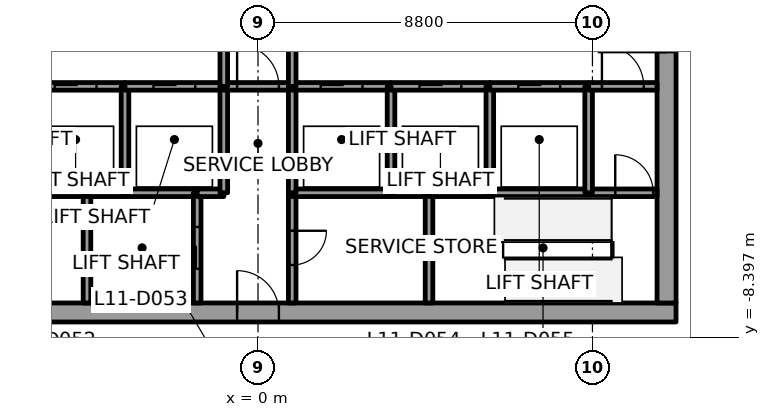
"""IFC4 building model, lengths in metres.
Left out: names, types, materials, properties, quantities, classifications, styles, units other than length and angle.
Written with IfcOpenShell. Run it as: python <this file> out.ifc"""

import sys

from ifc_helpers import new_model, si_unit, direction, frame, frame_2d, origin, place, context, subcontext, project, spatial, rectangle, extrude, element, fill, save


model = new_model("IFC4")
c1 = context("Model", 3, precision=1e-05, world=origin(), true_north=direction((0.0, 1.0)))
c2 = subcontext(c1, "Body", "Model", "MODEL_VIEW")
j1 = project(units=[si_unit("LENGTHUNIT", "METRE"), si_unit("PLANEANGLEUNIT", "RADIAN")], contexts=[c1])
p1 = place(None, origin())
s1 = spatial("IfcSite", under=j1, at=p1, CompositionType="ELEMENT")
p2 = place(p1, origin())
s2 = spatial("IfcBuilding", under=s1, at=p2, CompositionType="ELEMENT")
p3 = place(p2, frame((0.0, 0.0, 62.8)))
s3 = spatial("IfcBuildingStorey", under=s2, at=p3, CompositionType="ELEMENT", Elevation=62.8)
p4 = place(p3, frame((-11.0, -7.75, 0.0), z_axis=(0.0, 0.0, 1.0), x_axis=(1.0, 0.0, 0.0)))
e1 = element("IfcWall", 1, at=p4, inside=s3, PredefinedType="SHEAR", context=c2, shape_type="SweptSolid", body=[
    extrude(rectangle(XDim=22.0, YDim=0.5, at=frame_2d((11.0, 0.0))), origin(), (0.0, 0.0, 1.0), 3.7),
])
p5 = place(p4, frame((10.45, 0.0, 0.0)))
e2 = element("IfcOpeningElement", 2, at=p5, cuts=e1, PredefinedType="OPENING", context=c2, shape_type="SweptSolid", body=[
    extrude(rectangle(XDim=1.1, YDim=2.1, at=frame_2d((0.55, 1.05))), frame((0.0, 0.25, 0.0), z_axis=(0.0, -1.0, 0.0), x_axis=(1.0, 0.0, 0.0)), (0.0, 0.0, 1.0), 0.5),
])
p6 = place(p3, frame((10.75, -7.5, 0.0), z_axis=(0.0, 0.0, 1.0), x_axis=(0.0, 1.0, 0.0)))
e3 = element("IfcWall", 3, at=p6, inside=s3, PredefinedType="SHEAR", context=c2, shape_type="SweptSolid", body=[
    extrude(rectangle(XDim=15.0, YDim=0.5, at=frame_2d((7.5, 0.0))), origin(), (0.0, 0.0, 1.0), 3.7),
])
p7 = place(p6, frame((6.6, 0.0, 0.0)))
e4 = element("IfcOpeningElement", 4, at=p7, cuts=e3, PredefinedType="OPENING", context=c2, shape_type="SweptSolid", body=[
    extrude(rectangle(XDim=1.8, YDim=2.1, at=frame_2d((0.9, 1.05))), frame((0.0, 0.25, 0.0), z_axis=(0.0, -1.0, 0.0), x_axis=(1.0, 0.0, 0.0)), (0.0, 0.0, 1.0), 0.5),
])
p8 = place(p3, frame((-6.1, -4.6, 0.0), z_axis=(0.0, 0.0, 1.0), x_axis=(1.0, 0.0, 0.0)))
e5 = element("IfcWall", 5, at=p8, inside=s3, PredefinedType="SOLIDWALL", context=c2, shape_type="SweptSolid", body=[
    extrude(rectangle(XDim=1.6, YDim=0.2, at=frame_2d((0.8, 0.0))), origin(), (0.0, 0.0, 1.0), 3.55),
])
p9 = place(p3, frame((-6.1, -1.8, 0.0), z_axis=(0.0, 0.0, 1.0), x_axis=(1.0, 0.0, 0.0)))
e6 = element("IfcWall", 6, at=p9, inside=s3, PredefinedType="SOLIDWALL", context=c2, shape_type="SweptSolid", body=[
    extrude(rectangle(XDim=2.6, YDim=0.2, at=frame_2d((1.3, 0.0))), origin(), (0.0, 0.0, 1.0), 3.55),
])
p10 = place(p9, frame((0.75, 0.0, 0.0)))
e7 = element("IfcOpeningElement", 7, at=p10, cuts=e6, PredefinedType="OPENING", context=c2, shape_type="SweptSolid", body=[
    extrude(rectangle(XDim=1.1, YDim=2.1, at=frame_2d((0.55, 1.05))), frame((0.0, 0.1, 0.0), z_axis=(0.0, -1.0, 0.0), x_axis=(1.0, 0.0, 0.0)), (0.0, 0.0, 1.0), 0.2),
])
p11 = place(p3, frame((-4.5, -4.6, 0.0), z_axis=(0.0, 0.0, 1.0), x_axis=(0.0, -1.0, 0.0)))
e8 = element("IfcWall", 8, at=p11, inside=s3, PredefinedType="SOLIDWALL", context=c2, shape_type="SweptSolid", body=[
    extrude(rectangle(XDim=2.9, YDim=0.2, at=frame_2d((1.45, 0.0))), origin(), (0.0, 0.0, 1.0), 3.55),
])
p12 = place(p3, frame((-4.5, -4.6, 0.0), z_axis=(0.0, 0.0, 1.0), x_axis=(1.0, 0.0, 0.0)))
e9 = element("IfcWall", 9, at=p12, inside=s3, PredefinedType="SOLIDWALL", context=c2, shape_type="SweptSolid", body=[
    extrude(rectangle(XDim=1.0, YDim=0.2, at=frame_2d((0.5, 0.0))), origin(), (0.0, 0.0, 1.0), 3.55),
])
p13 = place(p3, frame((-3.5, -4.6, 0.0), z_axis=(0.0, 0.0, 1.0), x_axis=(1.0, 0.0, 0.0)))
e10 = element("IfcWall", 10, at=p13, inside=s3, PredefinedType="SOLIDWALL", context=c2, shape_type="SweptSolid", body=[
    extrude(rectangle(XDim=1.9, YDim=0.2, at=frame_2d((0.95, 0.0))), origin(), (0.0, 0.0, 1.0), 3.55),
])
p14 = place(p3, frame((-3.5, -4.6, 0.0), z_axis=(0.0, 0.0, 1.0), x_axis=(0.0, 1.0, 0.0)))
e11 = element("IfcWall", 11, at=p14, inside=s3, PredefinedType="SOLIDWALL", context=c2, shape_type="SweptSolid", body=[
    extrude(rectangle(XDim=2.8, YDim=0.2, at=frame_2d((1.4, 0.0))), origin(), (0.0, 0.0, 1.0), 3.55),
])
p15 = place(p3, frame((-3.5, -1.8, 0.0), z_axis=(0.0, 0.0, 1.0), x_axis=(1.0, 0.0, 0.0)))
e12 = element("IfcWall", 12, at=p15, inside=s3, PredefinedType="SOLIDWALL", context=c2, shape_type="SweptSolid", body=[
    extrude(rectangle(XDim=2.6, YDim=0.2, at=frame_2d((1.3, 0.0))), origin(), (0.0, 0.0, 1.0), 3.55),
])
p16 = place(p15, frame((0.75, 0.0, 0.0)))
e13 = element("IfcOpeningElement", 13, at=p16, cuts=e12, PredefinedType="OPENING", context=c2, shape_type="SweptSolid", body=[
    extrude(rectangle(XDim=1.1, YDim=2.1, at=frame_2d((0.55, 1.05))), frame((0.0, 0.1, 0.0), z_axis=(0.0, -1.0, 0.0), x_axis=(1.0, 0.0, 0.0)), (0.0, 0.0, 1.0), 0.2),
])
p17 = place(p3, frame((-1.6, -7.5, 0.0), z_axis=(0.0, 0.0, 1.0), x_axis=(0.0, 1.0, 0.0)))
e14 = element("IfcWall", 14, at=p17, inside=s3, PredefinedType="SOLIDWALL", context=c2, shape_type="SweptSolid", body=[
    extrude(rectangle(XDim=2.9, YDim=0.2, at=frame_2d((1.45, 0.0))), origin(), (0.0, 0.0, 1.0), 3.55),
])
p18 = place(p17, frame((0.9, 0.0, 0.0)))
e15 = element("IfcOpeningElement", 15, at=p18, cuts=e14, PredefinedType="OPENING", context=c2, shape_type="SweptSolid", body=[
    extrude(rectangle(XDim=1.1, YDim=2.1, at=frame_2d((0.55, 1.05))), frame((0.0, 0.1, 0.0), z_axis=(0.0, -1.0, 0.0), x_axis=(1.0, 0.0, 0.0)), (0.0, 0.0, 1.0), 0.2),
])
p19 = place(p3, frame((-1.6, -4.6, 0.0), z_axis=(0.0, 0.0, 1.0), x_axis=(1.0, 0.0, 0.0)))
e16 = element("IfcWall", 16, at=p19, inside=s3, PredefinedType="SOLIDWALL", context=c2, shape_type="SweptSolid", body=[
    extrude(rectangle(XDim=0.7, YDim=0.2, at=frame_2d((0.35, 0.0))), origin(), (0.0, 0.0, 1.0), 3.55),
])
p20 = place(p3, frame((-0.9, -4.6, 0.0), z_axis=(0.0, 0.0, 1.0), x_axis=(0.0, 1.0, 0.0)))
e17 = element("IfcWall", 17, at=p20, inside=s3, PredefinedType="SOLIDWALL", context=c2, shape_type="SweptSolid", body=[
    extrude(rectangle(XDim=2.8, YDim=0.2, at=frame_2d((1.4, 0.0))), origin(), (0.0, 0.0, 1.0), 3.55),
])
p21 = place(p3, frame((-0.9, -1.8, 0.0), z_axis=(0.0, 0.0, 1.0), x_axis=(1.0, 0.0, 0.0)))
e18 = element("IfcWall", 18, at=p21, inside=s3, PredefinedType="SOLIDWALL", context=c2, shape_type="SweptSolid", body=[
    extrude(rectangle(XDim=1.8, YDim=0.2, at=frame_2d((0.9, 0.0))), origin(), (0.0, 0.0, 1.0), 3.55),
])
p22 = place(p21, frame((0.35, 0.0, 0.0)))
e19 = element("IfcOpeningElement", 19, at=p22, cuts=e18, PredefinedType="OPENING", context=c2, shape_type="SweptSolid", body=[
    extrude(rectangle(XDim=1.1, YDim=2.1, at=frame_2d((0.55, 1.05))), frame((0.0, 0.1, 0.0), z_axis=(0.0, -1.0, 0.0), x_axis=(1.0, 0.0, 0.0)), (0.0, 0.0, 1.0), 0.2),
])
p23 = place(p3, frame((-0.9, 1.8, 0.0), z_axis=(0.0, 0.0, 1.0), x_axis=(0.0, -1.0, 0.0)))
e20 = element("IfcWall", 20, at=p23, inside=s3, PredefinedType="SOLIDWALL", context=c2, shape_type="SweptSolid", body=[
    extrude(rectangle(XDim=3.6, YDim=0.2, at=frame_2d((1.8, 0.0))), origin(), (0.0, 0.0, 1.0), 3.55),
])
p24 = place(p23, frame((1.05, 0.0, 0.0)))
e21 = element("IfcOpeningElement", 21, at=p24, cuts=e20, PredefinedType="OPENING", context=c2, shape_type="SweptSolid", body=[
    extrude(rectangle(XDim=1.5, YDim=2.1, at=frame_2d((0.75, 1.05))), frame((0.0, 0.1, 0.0), z_axis=(0.0, -1.0, 0.0), x_axis=(1.0, 0.0, 0.0)), (0.0, 0.0, 1.0), 0.2),
])
p25 = place(p3, frame((0.9, -4.6, 0.0), z_axis=(0.0, 0.0, 1.0), x_axis=(0.0, -1.0, 0.0)))
e22 = element("IfcWall", 22, at=p25, inside=s3, PredefinedType="SOLIDWALL", context=c2, shape_type="SweptSolid", body=[
    extrude(rectangle(XDim=2.9, YDim=0.2, at=frame_2d((1.45, 0.0))), origin(), (0.0, 0.0, 1.0), 3.55),
])
p26 = place(p25, frame((1.0, 0.0, 0.0)))
e23 = element("IfcOpeningElement", 23, at=p26, cuts=e22, PredefinedType="OPENING", context=c2, shape_type="SweptSolid", body=[
    extrude(rectangle(XDim=0.9, YDim=2.1, at=frame_2d((0.45, 1.05))), frame((0.0, 0.1, 0.0), z_axis=(0.0, -1.0, 0.0), x_axis=(1.0, 0.0, 0.0)), (0.0, 0.0, 1.0), 0.2),
])
p27 = place(p3, frame((3.5, -4.6, 0.0), z_axis=(0.0, 0.0, 1.0), x_axis=(-1.0, 0.0, 0.0)))
e24 = element("IfcWall", 24, at=p27, inside=s3, PredefinedType="SOLIDWALL", context=c2, shape_type="SweptSolid", body=[
    extrude(rectangle(XDim=2.6, YDim=0.2, at=frame_2d((1.3, 0.0))), origin(), (0.0, 0.0, 1.0), 3.55),
])
p28 = place(p3, frame((0.9, -1.8, 0.0), z_axis=(0.0, 0.0, 1.0), x_axis=(0.0, -1.0, 0.0)))
e25 = element("IfcWall", 25, at=p28, inside=s3, PredefinedType="SOLIDWALL", context=c2, shape_type="SweptSolid", body=[
    extrude(rectangle(XDim=2.8, YDim=0.2, at=frame_2d((1.4, 0.0))), origin(), (0.0, 0.0, 1.0), 3.55),
])
p29 = place(p3, frame((0.9, -1.8, 0.0), z_axis=(0.0, 0.0, 1.0), x_axis=(1.0, 0.0, 0.0)))
e26 = element("IfcWall", 26, at=p29, inside=s3, PredefinedType="SOLIDWALL", context=c2, shape_type="SweptSolid", body=[
    extrude(rectangle(XDim=2.6, YDim=0.2, at=frame_2d((1.3, 0.0))), origin(), (0.0, 0.0, 1.0), 3.55),
])
p30 = place(p29, frame((0.75, 0.0, 0.0)))
e27 = element("IfcOpeningElement", 27, at=p30, cuts=e26, PredefinedType="OPENING", context=c2, shape_type="SweptSolid", body=[
    extrude(rectangle(XDim=1.1, YDim=2.1, at=frame_2d((0.55, 1.05))), frame((0.0, 0.1, 0.0), z_axis=(0.0, -1.0, 0.0), x_axis=(1.0, 0.0, 0.0)), (0.0, 0.0, 1.0), 0.2),
])
p31 = place(p3, frame((0.9, -1.8, 0.0), z_axis=(0.0, 0.0, 1.0), x_axis=(0.0, 1.0, 0.0)))
e28 = element("IfcWall", 28, at=p31, inside=s3, PredefinedType="SOLIDWALL", context=c2, shape_type="SweptSolid", body=[
    extrude(rectangle(XDim=3.6, YDim=0.2, at=frame_2d((1.8, 0.0))), origin(), (0.0, 0.0, 1.0), 3.55),
])
p32 = place(p31, frame((1.05, 0.0, 0.0)))
e29 = element("IfcOpeningElement", 29, at=p32, cuts=e28, PredefinedType="OPENING", context=c2, shape_type="SweptSolid", body=[
    extrude(rectangle(XDim=1.5, YDim=2.1, at=frame_2d((0.75, 1.05))), frame((0.0, 0.1, 0.0), z_axis=(0.0, -1.0, 0.0), x_axis=(1.0, 0.0, 0.0)), (0.0, 0.0, 1.0), 0.2),
])
p33 = place(p3, frame((4.5, -4.6, 0.0), z_axis=(0.0, 0.0, 1.0), x_axis=(-1.0, 0.0, 0.0)))
e30 = element("IfcWall", 30, at=p33, inside=s3, PredefinedType="SOLIDWALL", context=c2, shape_type="SweptSolid", body=[
    extrude(rectangle(XDim=1.0, YDim=0.2, at=frame_2d((0.5, 0.0))), origin(), (0.0, 0.0, 1.0), 3.55),
])
p34 = place(p3, frame((3.5, -4.6, 0.0), z_axis=(0.0, 0.0, 1.0), x_axis=(0.0, 1.0, 0.0)))
e31 = element("IfcWall", 31, at=p34, inside=s3, PredefinedType="SOLIDWALL", context=c2, shape_type="SweptSolid", body=[
    extrude(rectangle(XDim=2.8, YDim=0.2, at=frame_2d((1.4, 0.0))), origin(), (0.0, 0.0, 1.0), 3.55),
])
p35 = place(p3, frame((3.5, -1.8, 0.0), z_axis=(0.0, 0.0, 1.0), x_axis=(1.0, 0.0, 0.0)))
e32 = element("IfcWall", 32, at=p35, inside=s3, PredefinedType="SOLIDWALL", context=c2, shape_type="SweptSolid", body=[
    extrude(rectangle(XDim=2.6, YDim=0.2, at=frame_2d((1.3, 0.0))), origin(), (0.0, 0.0, 1.0), 3.55),
])
p36 = place(p35, frame((0.75, 0.0, 0.0)))
e33 = element("IfcOpeningElement", 33, at=p36, cuts=e32, PredefinedType="OPENING", context=c2, shape_type="SweptSolid", body=[
    extrude(rectangle(XDim=1.1, YDim=2.1, at=frame_2d((0.55, 1.05))), frame((0.0, 0.1, 0.0), z_axis=(0.0, -1.0, 0.0), x_axis=(1.0, 0.0, 0.0)), (0.0, 0.0, 1.0), 0.2),
])
p37 = place(p3, frame((4.5, -7.5, 0.0), z_axis=(0.0, 0.0, 1.0), x_axis=(0.0, 1.0, 0.0)))
e34 = element("IfcWall", 34, at=p37, inside=s3, PredefinedType="SOLIDWALL", context=c2, shape_type="SweptSolid", body=[
    extrude(rectangle(XDim=2.9, YDim=0.2, at=frame_2d((1.45, 0.0))), origin(), (0.0, 0.0, 1.0), 3.55),
])
p38 = place(p3, frame((4.5, -4.6, 0.0), z_axis=(0.0, 0.0, 1.0), x_axis=(1.0, 0.0, 0.0)))
e35 = element("IfcWall", 35, at=p38, inside=s3, PredefinedType="SOLIDWALL", context=c2, shape_type="SweptSolid", body=[
    extrude(rectangle(XDim=1.6, YDim=0.2, at=frame_2d((0.8, 0.0))), origin(), (0.0, 0.0, 1.0), 3.55),
])
p39 = place(p3, frame((6.1, -4.6, 0.0), z_axis=(0.0, 0.0, 1.0), x_axis=(1.0, 0.0, 0.0)))
e36 = element("IfcWall", 36, at=p39, inside=s3, PredefinedType="SOLIDWALL", context=c2, shape_type="SweptSolid", body=[
    extrude(rectangle(XDim=2.6, YDim=0.2, at=frame_2d((1.3, 0.0))), origin(), (0.0, 0.0, 1.0), 3.55),
])
p40 = place(p3, frame((6.1, -4.6, 0.0), z_axis=(0.0, 0.0, 1.0), x_axis=(0.0, 1.0, 0.0)))
e37 = element("IfcWall", 37, at=p40, inside=s3, PredefinedType="SOLIDWALL", context=c2, shape_type="SweptSolid", body=[
    extrude(rectangle(XDim=2.8, YDim=0.2, at=frame_2d((1.4, 0.0))), origin(), (0.0, 0.0, 1.0), 3.55),
])
p41 = place(p3, frame((6.1, -1.8, 0.0), z_axis=(0.0, 0.0, 1.0), x_axis=(1.0, 0.0, 0.0)))
e38 = element("IfcWall", 38, at=p41, inside=s3, PredefinedType="SOLIDWALL", context=c2, shape_type="SweptSolid", body=[
    extrude(rectangle(XDim=2.6, YDim=0.2, at=frame_2d((1.3, 0.0))), origin(), (0.0, 0.0, 1.0), 3.55),
])
p42 = place(p41, frame((0.75, 0.0, 0.0)))
e39 = element("IfcOpeningElement", 39, at=p42, cuts=e38, PredefinedType="OPENING", context=c2, shape_type="SweptSolid", body=[
    extrude(rectangle(XDim=1.1, YDim=2.1, at=frame_2d((0.55, 1.05))), frame((0.0, 0.1, 0.0), z_axis=(0.0, -1.0, 0.0), x_axis=(1.0, 0.0, 0.0)), (0.0, 0.0, 1.0), 0.2),
])
p43 = place(p3, frame((8.7, -4.6, 0.0), z_axis=(0.0, 0.0, 1.0), x_axis=(1.0, 0.0, 0.0)))
e40 = element("IfcWall", 40, at=p43, inside=s3, PredefinedType="SOLIDWALL", context=c2, shape_type="SweptSolid", body=[
    extrude(rectangle(XDim=1.8, YDim=0.2, at=frame_2d((0.9, 0.0))), origin(), (0.0, 0.0, 1.0), 3.55),
])
p44 = place(p43, frame((0.7, 0.0, 0.0)))
e41 = element("IfcOpeningElement", 41, at=p44, cuts=e40, PredefinedType="OPENING", context=c2, shape_type="SweptSolid", body=[
    extrude(rectangle(XDim=1.0, YDim=2.1, at=frame_2d((0.5, 1.05))), frame((0.0, 0.1, 0.0), z_axis=(0.0, -1.0, 0.0), x_axis=(1.0, 0.0, 0.0)), (0.0, 0.0, 1.0), 0.2),
])
p45 = place(p3, frame((8.7, -1.8, 0.0), z_axis=(0.0, 0.0, 1.0), x_axis=(0.0, -1.0, 0.0)))
e42 = element("IfcWall", 42, at=p45, inside=s3, PredefinedType="SOLIDWALL", context=c2, shape_type="SweptSolid", body=[
    extrude(rectangle(XDim=2.8, YDim=0.2, at=frame_2d((1.4, 0.0))), origin(), (0.0, 0.0, 1.0), 3.55),
])
p46 = place(p3, frame((8.7, -1.8, 0.0), z_axis=(0.0, 0.0, 1.0), x_axis=(1.0, 0.0, 0.0)))
e43 = element("IfcWall", 43, at=p46, inside=s3, PredefinedType="SOLIDWALL", context=c2, shape_type="SweptSolid", body=[
    extrude(rectangle(XDim=1.8, YDim=0.2, at=frame_2d((0.9, 0.0))), origin(), (0.0, 0.0, 1.0), 3.55),
])
p47 = place(p46, frame((0.35, 0.0, 0.0)))
e44 = element("IfcOpeningElement", 44, at=p47, cuts=e43, PredefinedType="OPENING", context=c2, shape_type="SweptSolid", body=[
    extrude(rectangle(XDim=1.1, YDim=2.1, at=frame_2d((0.55, 1.05))), frame((0.0, 0.1, 0.0), z_axis=(0.0, -1.0, 0.0), x_axis=(1.0, 0.0, 0.0)), (0.0, 0.0, 1.0), 0.2),
])
p48 = place(p10, origin())
e45 = element("IfcDoor", 45, at=p48, inside=s3, OperationType="SLIDING_TO_RIGHT", PredefinedType="DOOR", context=c2, shape_type="SweptSolid", body=[
    extrude(rectangle(XDim=1.1, YDim=2.1, at=frame_2d((0.55, 1.05))), frame((0.0, 0.025, 0.0), z_axis=(0.0, -1.0, 0.0), x_axis=(1.0, 0.0, 0.0)), (0.0, 0.0, 1.0), 0.05),
])
fill(e7, e45)
p49 = place(p16, origin())
e46 = element("IfcDoor", 46, at=p49, inside=s3, OperationType="SLIDING_TO_RIGHT", PredefinedType="DOOR", context=c2, shape_type="SweptSolid", body=[
    extrude(rectangle(XDim=1.1, YDim=2.1, at=frame_2d((0.55, 1.05))), frame((0.0, 0.025, 0.0), z_axis=(0.0, -1.0, 0.0), x_axis=(1.0, 0.0, 0.0)), (0.0, 0.0, 1.0), 0.05),
])
fill(e13, e46)
p50 = place(p30, origin())
e47 = element("IfcDoor", 47, at=p50, inside=s3, OperationType="SLIDING_TO_LEFT", PredefinedType="DOOR", context=c2, shape_type="SweptSolid", body=[
    extrude(rectangle(XDim=1.1, YDim=2.1, at=frame_2d((0.55, 1.05))), frame((0.0, 0.025, 0.0), z_axis=(0.0, -1.0, 0.0), x_axis=(1.0, 0.0, 0.0)), (0.0, 0.0, 1.0), 0.05),
])
fill(e27, e47)
p51 = place(p36, origin())
e48 = element("IfcDoor", 48, at=p51, inside=s3, OperationType="SLIDING_TO_LEFT", PredefinedType="DOOR", context=c2, shape_type="SweptSolid", body=[
    extrude(rectangle(XDim=1.1, YDim=2.1, at=frame_2d((0.55, 1.05))), frame((0.0, 0.025, 0.0), z_axis=(0.0, -1.0, 0.0), x_axis=(1.0, 0.0, 0.0)), (0.0, 0.0, 1.0), 0.05),
])
fill(e33, e48)
p52 = place(p42, origin())
e49 = element("IfcDoor", 49, at=p52, inside=s3, OperationType="SLIDING_TO_RIGHT", PredefinedType="DOOR", context=c2, shape_type="SweptSolid", body=[
    extrude(rectangle(XDim=1.1, YDim=2.1, at=frame_2d((0.55, 1.05))), frame((0.0, 0.025, 0.0), z_axis=(0.0, -1.0, 0.0), x_axis=(1.0, 0.0, 0.0)), (0.0, 0.0, 1.0), 0.05),
])
fill(e39, e49)
p53 = place(p18, origin())
e50 = element("IfcDoor", 50, at=p53, inside=s3, OperationType="SLIDING_TO_RIGHT", PredefinedType="DOOR", context=c2, shape_type="SweptSolid", body=[
    extrude(rectangle(XDim=1.1, YDim=2.1, at=frame_2d((0.55, 1.05))), frame((0.0, 0.025, 0.0), z_axis=(0.0, -1.0, 0.0), x_axis=(1.0, 0.0, 0.0)), (0.0, 0.0, 1.0), 0.05),
])
fill(e15, e50)
p54 = place(p47, origin())
e51 = element("IfcDoor", 51, at=p54, inside=s3, OperationType="SINGLE_SWING_LEFT", PredefinedType="DOOR", context=c2, shape_type="SweptSolid", body=[
    extrude(rectangle(XDim=1.1, YDim=2.1, at=frame_2d((0.55, 1.05))), frame((0.0, 0.025, 0.0), z_axis=(0.0, -1.0, 0.0), x_axis=(1.0, 0.0, 0.0)), (0.0, 0.0, 1.0), 0.05),
])
fill(e44, e51)
p55 = place(p22, origin())
e52 = element("IfcDoor", 52, at=p55, inside=s3, OperationType="SINGLE_SWING_LEFT", PredefinedType="DOOR", context=c2, shape_type="SweptSolid", body=[
    extrude(rectangle(XDim=1.1, YDim=2.1, at=frame_2d((0.55, 1.05))), frame((0.0, 0.025, 0.0), z_axis=(0.0, -1.0, 0.0), x_axis=(1.0, 0.0, 0.0)), (0.0, 0.0, 1.0), 0.05),
])
fill(e19, e52)
p56 = place(p44, origin())
e53 = element("IfcDoor", 53, at=p56, inside=s3, OperationType="SINGLE_SWING_RIGHT", PredefinedType="DOOR", context=c2, shape_type="SweptSolid", body=[
    extrude(rectangle(XDim=1.0, YDim=2.1, at=frame_2d((0.5, 1.05))), frame((0.0, 0.025, 0.0), z_axis=(0.0, -1.0, 0.0), x_axis=(1.0, 0.0, 0.0)), (0.0, 0.0, 1.0), 0.05),
])
fill(e41, e53)
p57 = place(p26, origin())
e54 = element("IfcDoor", 54, at=p57, inside=s3, OperationType="SINGLE_SWING_RIGHT", PredefinedType="DOOR", context=c2, shape_type="SweptSolid", body=[
    extrude(rectangle(XDim=0.9, YDim=2.1, at=frame_2d((0.45, 1.05))), frame((0.0, 0.025, 0.0), z_axis=(0.0, -1.0, 0.0), x_axis=(1.0, 0.0, 0.0)), (0.0, 0.0, 1.0), 0.05),
])
fill(e23, e54)
p58 = place(p7, origin())
e55 = element("IfcDoor", 55, at=p58, inside=s3, OperationType="DOUBLE_DOOR_SINGLE_SWING", PredefinedType="DOOR", context=c2, shape_type="SweptSolid", body=[
    extrude(rectangle(XDim=1.8, YDim=2.1, at=frame_2d((0.9, 1.05))), frame((0.0, 0.025, 0.0), z_axis=(0.0, -1.0, 0.0), x_axis=(1.0, 0.0, 0.0)), (0.0, 0.0, 1.0), 0.05),
])
fill(e4, e55)
p59 = place(p5, origin())
e56 = element("IfcDoor", 56, at=p59, inside=s3, OperationType="SINGLE_SWING_LEFT", PredefinedType="DOOR", context=c2, shape_type="SweptSolid", body=[
    extrude(rectangle(XDim=1.1, YDim=2.1, at=frame_2d((0.55, 1.05))), frame((0.0, 0.025, 0.0), z_axis=(0.0, -1.0, 0.0), x_axis=(1.0, 0.0, 0.0)), (0.0, 0.0, 1.0), 0.05),
])
fill(e2, e56)
save(model, sys.argv[1])
